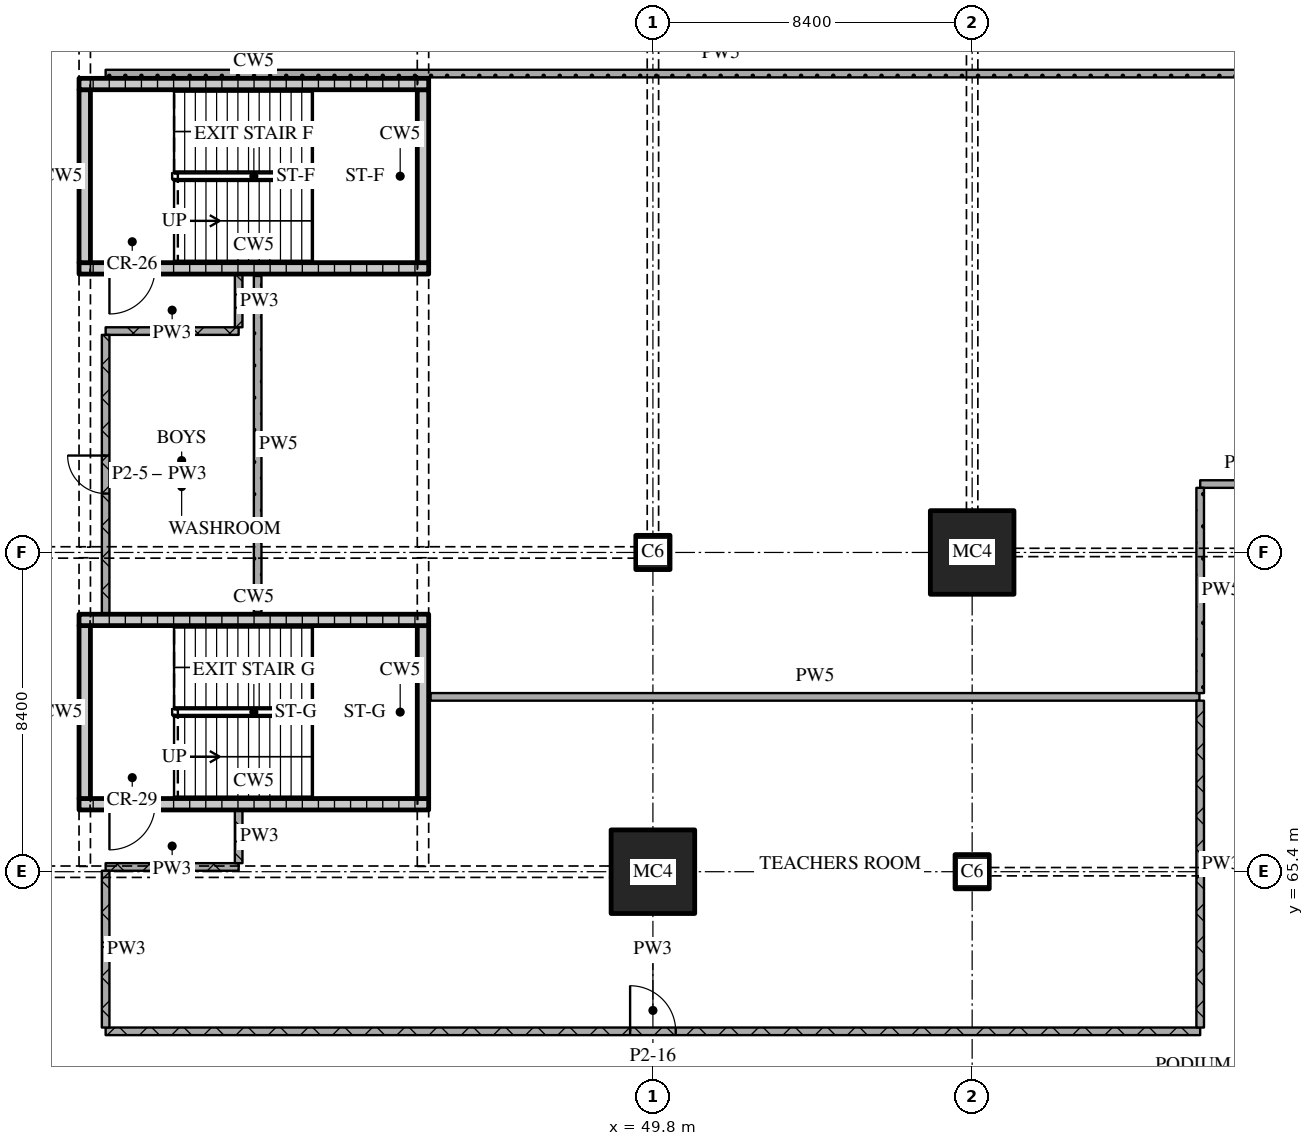
"""IFC4 building model, lengths in metres.
Left out: names, types, materials, properties, quantities, classifications, styles, units other than length and angle.
Written with IfcOpenShell. Run it as: python <this file> out.ifc"""

import sys

from ifc_helpers import new_model, si_unit, direction, frame, frame_2d, origin, origin_2d, place, context, subcontext, project, spatial, rectangle, extrude, element, fill, save


model = new_model("IFC4")
c1 = context("Model", 3, precision=1e-05, world=origin(), true_north=direction((0.0, 1.0)))
c2 = subcontext(c1, "Body", "Model", "MODEL_VIEW")
j1 = project(units=[si_unit("LENGTHUNIT", "METRE"), si_unit("PLANEANGLEUNIT", "RADIAN")], contexts=[c1])
p1 = place(None, origin())
s1 = spatial("IfcSite", under=j1, at=p1, CompositionType="ELEMENT")
p2 = place(p1, origin())
s2 = spatial("IfcBuilding", under=s1, at=p2, CompositionType="ELEMENT")
p3 = place(p2, frame((0.0, 0.0, 14.4)))
s3 = spatial("IfcBuildingStorey", under=s2, at=p3, CompositionType="ELEMENT", Elevation=14.4)
p4 = place(p3, frame((49.8, 65.4, 0.0), z_axis=(0.0, 0.0, 1.0), x_axis=(1.0, 0.0, 0.0)))
e1 = element("IfcColumn", 1, at=p4, inside=s3, PredefinedType="COLUMN", context=c2, shape_type="SweptSolid", body=[
    extrude(rectangle(XDim=2.2, YDim=2.2, at=origin_2d()), origin(), (0.0, 0.0, 1.0), 4.8),
])
for number, where, z_axis, x_axis in (
    (2, (49.8, 73.8, 0.0), (0.0, 0.0, 1.0), (1.0, 0.0, 0.0)),
    (3, (58.2, 65.4, 0.0), (0.0, 0.0, 1.0), (1.0, 0.0, 0.0)),
):
    element("IfcColumn", number, at=place(p3, frame(where, z_axis=z_axis, x_axis=x_axis)), inside=s3, PredefinedType="COLUMN", context=c2, shape_type="SweptSolid", body=[
        extrude(rectangle(XDim=0.9, YDim=0.9, at=origin_2d()), origin(), (0.0, 0.0, 1.0), 4.8),
    ])
p5 = place(p3, frame((58.2, 73.8, 0.0), z_axis=(0.0, 0.0, 1.0), x_axis=(1.0, 0.0, 0.0)))
e4 = element("IfcColumn", 4, at=p5, inside=s3, PredefinedType="COLUMN", context=c2, shape_type="SweptSolid", body=[
    extrude(rectangle(XDim=2.2, YDim=2.2, at=origin_2d()), origin(), (0.0, 0.0, 1.0), 4.8),
])
p6 = place(p3, frame((34.7, 81.275, 0.0), z_axis=(0.0, 0.0, 1.0), x_axis=(1.0, 0.0, 0.0)))
e5 = element("IfcWall", 5, at=p6, inside=s3, PredefinedType="SOLIDWALL", context=c2, shape_type="SweptSolid", body=[
    extrude(rectangle(XDim=9.2, YDim=0.3, at=frame_2d((4.6, 0.0))), origin(), (0.0, 0.0, 1.0), 4.5),
])
p7 = place(p6, frame((0.8, 0.0, 0.0)))
e6 = element("IfcOpeningElement", 6, at=p7, cuts=e5, PredefinedType="OPENING", context=c2, shape_type="SweptSolid", body=[
    extrude(rectangle(XDim=1.2, YDim=2.1, at=frame_2d((0.6, 1.05))), frame((0.0, 0.16, 0.0), z_axis=(0.0, -1.0, 0.0), x_axis=(1.0, 0.0, 0.0)), (0.0, 0.0, 1.0), 0.32),
])
for number, where, z_axis, x_axis in (
    (7, (34.85, 81.425, 0.0), (0.0, 0.0, 1.0), (0.0, 1.0, 0.0)),
    (8, (43.75, 81.425, 0.0), (0.0, 0.0, 1.0), (0.0, 1.0, 0.0)),
):
    element("IfcWall", number, at=place(p3, frame(where, z_axis=z_axis, x_axis=x_axis)), inside=s3, PredefinedType="SOLIDWALL", context=c2, shape_type="SweptSolid", body=[
        extrude(rectangle(XDim=4.55, YDim=0.3, at=frame_2d((2.275, 0.0))), origin(), (0.0, 0.0, 1.0), 4.5),
    ])
p8 = place(p3, frame((34.7, 86.125, 0.0), z_axis=(0.0, 0.0, 1.0), x_axis=(1.0, 0.0, 0.0)))
e9 = element("IfcWall", 9, at=p8, inside=s3, PredefinedType="SOLIDWALL", context=c2, shape_type="SweptSolid", body=[
    extrude(rectangle(XDim=9.2, YDim=0.3, at=frame_2d((4.6, 0.0))), origin(), (0.0, 0.0, 1.0), 4.5),
])
p9 = place(p3, frame((34.7, 67.175, 0.0), z_axis=(0.0, 0.0, 1.0), x_axis=(1.0, 0.0, 0.0)))
e10 = element("IfcWall", 10, at=p9, inside=s3, PredefinedType="SOLIDWALL", context=c2, shape_type="SweptSolid", body=[
    extrude(rectangle(XDim=9.2, YDim=0.3, at=frame_2d((4.6, 0.0))), origin(), (0.0, 0.0, 1.0), 4.5),
])
p10 = place(p9, frame((0.8, 0.0, 0.0)))
e11 = element("IfcOpeningElement", 11, at=p10, cuts=e10, PredefinedType="OPENING", context=c2, shape_type="SweptSolid", body=[
    extrude(rectangle(XDim=1.2, YDim=2.1, at=frame_2d((0.6, 1.05))), frame((0.0, 0.16, 0.0), z_axis=(0.0, -1.0, 0.0), x_axis=(1.0, 0.0, 0.0)), (0.0, 0.0, 1.0), 0.32),
])
for number, where, z_axis, x_axis in (
    (12, (34.85, 67.325, 0.0), (0.0, 0.0, 1.0), (0.0, 1.0, 0.0)),
    (13, (43.75, 67.325, 0.0), (0.0, 0.0, 1.0), (0.0, 1.0, 0.0)),
):
    element("IfcWall", number, at=place(p3, frame(where, z_axis=z_axis, x_axis=x_axis)), inside=s3, PredefinedType="SOLIDWALL", context=c2, shape_type="SweptSolid", body=[
        extrude(rectangle(XDim=4.55, YDim=0.3, at=frame_2d((2.275, 0.0))), origin(), (0.0, 0.0, 1.0), 4.5),
    ])
p11 = place(p3, frame((34.7, 72.025, 0.0), z_axis=(0.0, 0.0, 1.0), x_axis=(1.0, 0.0, 0.0)))
e14 = element("IfcWall", 14, at=p11, inside=s3, PredefinedType="SOLIDWALL", context=c2, shape_type="SweptSolid", body=[
    extrude(rectangle(XDim=9.2, YDim=0.3, at=frame_2d((4.6, 0.0))), origin(), (0.0, 0.0, 1.0), 4.5),
])
p12 = place(p3, frame((35.4, 61.2, 0.0), z_axis=(0.0, 0.0, 1.0), x_axis=(1.0, 0.0, 0.0)))
e15 = element("IfcWall", 15, at=p12, inside=s3, PredefinedType="PARTITIONING", context=c2, shape_type="SweptSolid", body=[
    extrude(rectangle(XDim=28.8, YDim=0.2, at=frame_2d((14.4, 0.0))), origin(), (0.0, 0.0, 1.0), 4.5),
])
p13 = place(p12, frame((13.8, 0.0, 0.0)))
e16 = element("IfcOpeningElement", 16, at=p13, cuts=e15, PredefinedType="OPENING", context=c2, shape_type="SweptSolid", body=[
    extrude(rectangle(XDim=1.2, YDim=2.1, at=frame_2d((0.6, 1.05))), frame((0.0, 0.11, 0.0), z_axis=(0.0, -1.0, 0.0), x_axis=(1.0, 0.0, 0.0)), (0.0, 0.0, 1.0), 0.22),
])
p14 = place(p3, frame((35.4, 65.525, 0.0), z_axis=(0.0, 0.0, 1.0), x_axis=(1.0, 0.0, 0.0)))
e17 = element("IfcWall", 17, at=p14, inside=s3, PredefinedType="PARTITIONING", context=c2, shape_type="SweptSolid", body=[
    extrude(rectangle(XDim=3.5, YDim=0.2, at=frame_2d((1.75, 0.0))), origin(), (0.0, 0.0, 1.0), 3.51),
])
p15 = place(p3, frame((43.95, 70.0, 0.0), z_axis=(0.0, 0.0, 1.0), x_axis=(1.0, 0.0, 0.0)))
e18 = element("IfcWall", 18, at=p15, inside=s3, PredefinedType="PARTITIONING", context=c2, shape_type="SweptSolid", body=[
    extrude(rectangle(XDim=20.23, YDim=0.2, at=frame_2d((10.115, 0.0))), origin(), (0.0, 0.0, 1.0), 4.5),
])
p16 = place(p3, frame((64.2, 75.6, 0.0), z_axis=(0.0, 0.0, 1.0), x_axis=(1.0, 0.0, 0.0)))
e19 = element("IfcWall", 19, at=p16, inside=s3, PredefinedType="PARTITIONING", context=c2, shape_type="SweptSolid", body=[
    extrude(rectangle(XDim=2.3, YDim=0.2, at=frame_2d((1.15, 0.0))), origin(), (0.0, 0.0, 1.0), 4.5),
])
p17 = place(p3, frame((35.4, 79.625, 0.0), z_axis=(0.0, 0.0, 1.0), x_axis=(1.0, 0.0, 0.0)))
e20 = element("IfcWall", 20, at=p17, inside=s3, PredefinedType="PARTITIONING", context=c2, shape_type="SweptSolid", body=[
    extrude(rectangle(XDim=3.5, YDim=0.2, at=frame_2d((1.75, 0.0))), origin(), (0.0, 0.0, 1.0), 4.5),
])
p18 = place(p3, frame((35.4, 86.4, 0.0), z_axis=(0.0, 0.0, 1.0), x_axis=(1.0, 0.0, 0.0)))
e21 = element("IfcWall", 21, at=p18, inside=s3, PredefinedType="PARTITIONING", context=c2, shape_type="SweptSolid", body=[
    extrude(rectangle(XDim=32.38, YDim=0.2, at=frame_2d((16.19, 0.0))), origin(), (0.0, 0.0, 1.0), 4.5),
])
p19 = place(p3, frame((35.4, 65.425, 0.0), z_axis=(0.0, 0.0, 1.0), x_axis=(0.0, -1.0, 0.0)))
e22 = element("IfcWall", 22, at=p19, inside=s3, PredefinedType="PARTITIONING", context=c2, shape_type="SweptSolid", body=[
    extrude(rectangle(XDim=4.125, YDim=0.2, at=frame_2d((2.062, 0.0))), origin(), (0.0, 0.0, 1.0), 4.5),
])
p20 = place(p3, frame((35.4, 79.525, 0.0), z_axis=(0.0, 0.0, 1.0), x_axis=(0.0, -1.0, 0.0)))
e23 = element("IfcWall", 23, at=p20, inside=s3, PredefinedType="PARTITIONING", context=c2, shape_type="SweptSolid", body=[
    extrude(rectangle(XDim=7.35, YDim=0.2, at=frame_2d((3.675, 0.0))), origin(), (0.0, 0.0, 1.0), 4.5),
])
p21 = place(p20, frame((3.175, 0.0, 0.0)))
e24 = element("IfcOpeningElement", 24, at=p21, cuts=e23, PredefinedType="OPENING", context=c2, shape_type="SweptSolid", body=[
    extrude(rectangle(XDim=1.0, YDim=2.1, at=frame_2d((0.5, 1.05))), frame((0.0, 0.11, 0.0), z_axis=(0.0, -1.0, 0.0), x_axis=(1.0, 0.0, 0.0)), (0.0, 0.0, 1.0), 0.22),
])
for number, where, z_axis, x_axis in (
    (25, (38.9, 67.025, 0.0), (0.0, 0.0, 1.0), (0.0, -1.0, 0.0)),
    (26, (38.9, 81.125, 0.0), (0.0, 0.0, 1.0), (0.0, -1.0, 0.0)),
):
    element("IfcWall", number, at=place(p3, frame(where, z_axis=z_axis, x_axis=x_axis)), inside=s3, PredefinedType="PARTITIONING", context=c2, shape_type="SweptSolid", body=[
        extrude(rectangle(XDim=1.4, YDim=0.2, at=frame_2d((0.7, 0.0))), origin(), (0.0, 0.0, 1.0), 4.5),
    ])
p22 = place(p3, frame((39.4, 81.075, 0.0), z_axis=(0.0, 0.0, 1.0), x_axis=(0.0, -1.0, 0.0)))
e27 = element("IfcWall", 27, at=p22, inside=s3, PredefinedType="PARTITIONING", context=c2, shape_type="SweptSolid", body=[
    extrude(rectangle(XDim=8.85, YDim=0.2, at=frame_2d((4.425, 0.0))), origin(), (0.0, 0.0, 1.0), 4.5),
])
p23 = place(p3, frame((64.2, 69.9, 0.0), z_axis=(0.0, 0.0, 1.0), x_axis=(0.0, -1.0, 0.0)))
e28 = element("IfcWall", 28, at=p23, inside=s3, PredefinedType="PARTITIONING", context=c2, shape_type="SweptSolid", body=[
    extrude(rectangle(XDim=8.6, YDim=0.2, at=frame_2d((4.3, 0.0))), origin(), (0.0, 0.0, 1.0), 4.5),
])
p24 = place(p3, frame((64.2, 75.5, 0.0), z_axis=(0.0, 0.0, 1.0), x_axis=(0.0, -1.0, 0.0)))
e29 = element("IfcWall", 29, at=p24, inside=s3, PredefinedType="PARTITIONING", context=c2, shape_type="SweptSolid", body=[
    extrude(rectangle(XDim=5.4, YDim=0.2, at=frame_2d((2.7, 0.0))), origin(), (0.0, 0.0, 1.0), 4.5),
])
p25 = place(p7, origin())
e30 = element("IfcDoor", 30, at=p25, inside=s3, OperationType="SINGLE_SWING_RIGHT", PredefinedType="DOOR", context=c2, shape_type="SweptSolid", body=[
    extrude(rectangle(XDim=1.2, YDim=2.1, at=frame_2d((0.6, 1.05))), frame((0.0, 0.025, 0.0), z_axis=(0.0, -1.0, 0.0), x_axis=(1.0, 0.0, 0.0)), (0.0, 0.0, 1.0), 0.05),
])
fill(e6, e30)
p26 = place(p10, origin())
e31 = element("IfcDoor", 31, at=p26, inside=s3, OperationType="SINGLE_SWING_RIGHT", PredefinedType="DOOR", context=c2, shape_type="SweptSolid", body=[
    extrude(rectangle(XDim=1.2, YDim=2.1, at=frame_2d((0.6, 1.05))), frame((0.0, 0.025, 0.0), z_axis=(0.0, -1.0, 0.0), x_axis=(1.0, 0.0, 0.0)), (0.0, 0.0, 1.0), 0.05),
])
fill(e11, e31)
p27 = place(p13, origin())
e32 = element("IfcDoor", 32, at=p27, inside=s3, OperationType="SINGLE_SWING_LEFT", PredefinedType="DOOR", context=c2, shape_type="SweptSolid", body=[
    extrude(rectangle(XDim=1.2, YDim=2.1, at=frame_2d((0.6, 1.05))), frame((0.0, 0.025, 0.0), z_axis=(0.0, -1.0, 0.0), x_axis=(1.0, 0.0, 0.0)), (0.0, 0.0, 1.0), 0.05),
])
fill(e16, e32)
p28 = place(p21, origin())
e33 = element("IfcDoor", 33, at=p28, inside=s3, OperationType="SINGLE_SWING_RIGHT", PredefinedType="DOOR", context=c2, shape_type="SweptSolid", body=[
    extrude(rectangle(XDim=1.0, YDim=2.1, at=frame_2d((0.5, 1.05))), frame((0.0, 0.025, 0.0), z_axis=(0.0, -1.0, 0.0), x_axis=(1.0, 0.0, 0.0)), (0.0, 0.0, 1.0), 0.05),
])
fill(e24, e33)
save(model, sys.argv[1])
